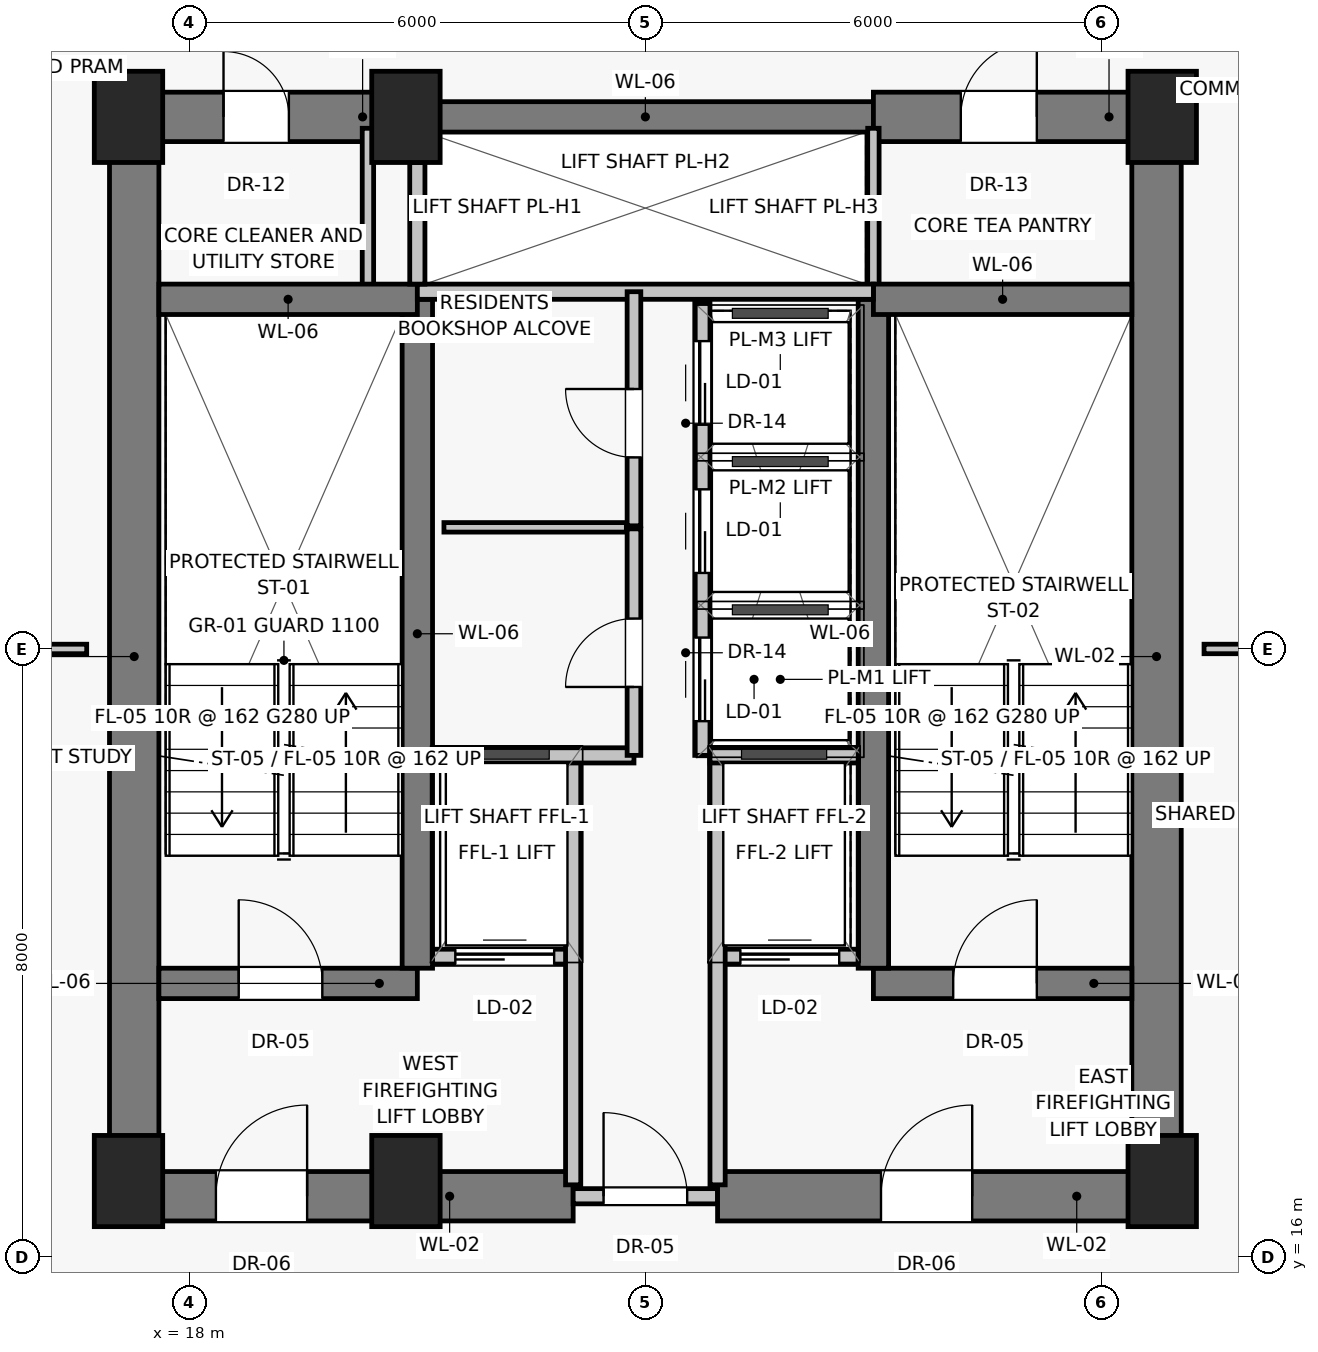
"""IFC4 building model, lengths in metres.
Left out: names, types, materials, properties, quantities, classifications, styles, units other than length and angle.
Written with IfcOpenShell. Run it as: python <this file> out.ifc"""

import sys

from ifc_helpers import new_model, si_unit, direction, frame, frame_2d, origin, origin_2d, place, context, subcontext, project, spatial, rectangle, extrude, source, transform, mapped, element, fill, save


model = new_model("IFC4")
c1 = context("Model", 3, precision=1e-05, world=origin(), true_north=direction((0.0, 1.0)))
c2 = subcontext(c1, "Body", "Model", "MODEL_VIEW")
j1 = project(units=[si_unit("LENGTHUNIT", "METRE"), si_unit("PLANEANGLEUNIT", "RADIAN")], contexts=[c1])
p1 = place(None, origin())
s1 = spatial("IfcSite", under=j1, at=p1, CompositionType="ELEMENT")
p2 = place(p1, origin())
s2 = spatial("IfcBuilding", under=s1, at=p2, CompositionType="ELEMENT")
p3 = place(p2, frame((0.0, 0.0, 116.5)))
s3 = spatial("IfcBuildingStorey", under=s2, at=p3, CompositionType="ELEMENT", Elevation=116.5)
for number, where, z_axis, x_axis in (
    (1, (17.2, 17.0, 0.0), (0.0, 0.0, 1.0), (1.0, 0.0, 0.0)),
    (2, (20.85, 17.0, 0.0), (0.0, 0.0, 1.0), (1.0, 0.0, 0.0)),
    (3, (30.8, 17.0, 0.0), (0.0, 0.0, 1.0), (1.0, 0.0, 0.0)),
    (4, (17.2, 31.0, 0.0), (0.0, 0.0, 1.0), (1.0, 0.0, 0.0)),
    (5, (20.85, 31.0, 0.0), (0.0, 0.0, 1.0), (1.0, 0.0, 0.0)),
    (6, (30.8, 31.0, 0.0), (0.0, 0.0, 1.0), (1.0, 0.0, 0.0)),
):
    element("IfcColumn", number, at=place(p3, frame(where, z_axis=z_axis, x_axis=x_axis)), inside=s3, PredefinedType="PILASTER", context=c2, shape_type="SweptSolid", body=[
        extrude(rectangle(XDim=0.9, YDim=1.2, at=origin_2d()), origin(), (0.0, 0.0, 1.0), 3.25),
    ])
for number, where, z_axis, x_axis in (
    (7, (17.275, 16.8, 0.0), (0.0, 0.0, 1.0), (0.0, 1.0, 0.0)),
    (8, (30.725, 16.8, 0.0), (0.0, 0.0, 1.0), (0.0, 1.0, 0.0)),
):
    element("IfcWall", number, at=place(p3, frame(where, z_axis=z_axis, x_axis=x_axis)), inside=s3, PredefinedType="SHEAR", context=c2, shape_type="SweptSolid", body=[
        extrude(rectangle(XDim=14.2, YDim=0.65, at=frame_2d((7.1, 0.0))), origin(), (0.0, 0.0, 1.0), 3.0),
    ])
p4 = place(p3, frame((17.2, 16.8, 0.0), z_axis=(0.0, 0.0, 1.0), x_axis=(1.0, 0.0, 0.0)))
e9 = element("IfcWall", 9, at=p4, inside=s3, PredefinedType="SHEAR", context=c2, shape_type="SweptSolid", body=[
    extrude(rectangle(XDim=5.85, YDim=0.65, at=frame_2d((2.925, 0.0))), origin(), (0.0, 0.0, 1.0), 3.0),
])
p5 = place(p4, frame((1.15, 0.0, 0.0)))
e10 = element("IfcOpeningElement", 10, at=p5, cuts=e9, PredefinedType="OPENING", context=c2, shape_type="SweptSolid", body=[
    extrude(rectangle(XDim=1.2, YDim=2.03, at=frame_2d((0.6, 1.015))), frame((0.0, 0.335, 0.0), z_axis=(0.0, -1.0, 0.0), x_axis=(1.0, 0.0, 0.0)), (0.0, 0.0, 1.0), 0.67),
])
p6 = place(p3, frame((23.05, 16.8, 0.0), z_axis=(0.0, 0.0, 1.0), x_axis=(1.0, 0.0, 0.0)))
e11 = element("IfcWall", 11, at=p6, inside=s3, PredefinedType="SOLIDWALL", context=c2, shape_type="SweptSolid", body=[
    extrude(rectangle(XDim=1.9, YDim=0.2, at=frame_2d((0.95, 0.0))), origin(), (0.0, 0.0, 1.0), 2.15),
])
p7 = place(p6, frame((0.4, 0.0, 0.0)))
e12 = element("IfcOpeningElement", 12, at=p7, cuts=e11, PredefinedType="OPENING", context=c2, shape_type="SweptSolid", body=[
    extrude(rectangle(XDim=1.1, YDim=2.03, at=frame_2d((0.55, 1.015))), frame((0.0, 0.11, 0.0), z_axis=(0.0, -1.0, 0.0), x_axis=(1.0, 0.0, 0.0)), (0.0, 0.0, 1.0), 0.22),
])
p8 = place(p3, frame((24.95, 16.8, 0.0), z_axis=(0.0, 0.0, 1.0), x_axis=(1.0, 0.0, 0.0)))
e13 = element("IfcWall", 13, at=p8, inside=s3, PredefinedType="SHEAR", context=c2, shape_type="SweptSolid", body=[
    extrude(rectangle(XDim=5.85, YDim=0.65, at=frame_2d((2.925, 0.0))), origin(), (0.0, 0.0, 1.0), 3.0),
])
p9 = place(p8, frame((2.15, 0.0, 0.0)))
e14 = element("IfcOpeningElement", 14, at=p9, cuts=e13, PredefinedType="OPENING", context=c2, shape_type="SweptSolid", body=[
    extrude(rectangle(XDim=1.2, YDim=2.03, at=frame_2d((0.6, 1.015))), frame((0.0, 0.335, 0.0), z_axis=(0.0, -1.0, 0.0), x_axis=(1.0, 0.0, 0.0)), (0.0, 0.0, 1.0), 0.67),
])
p10 = place(p3, frame((17.2, 31.0, 0.0), z_axis=(0.0, 0.0, 1.0), x_axis=(1.0, 0.0, 0.0)))
e15 = element("IfcWall", 15, at=p10, inside=s3, PredefinedType="SHEAR", context=c2, shape_type="SweptSolid", body=[
    extrude(rectangle(XDim=3.8, YDim=0.65, at=frame_2d((1.9, 0.0))), origin(), (0.0, 0.0, 1.0), 3.0),
])
p11 = place(p10, frame((1.25, 0.0, 0.0)))
e16 = element("IfcOpeningElement", 16, at=p11, cuts=e15, PredefinedType="OPENING", context=c2, shape_type="SweptSolid", body=[
    extrude(rectangle(XDim=0.86, YDim=2.01, at=frame_2d((0.43, 1.005))), frame((0.0, 0.335, 0.0), z_axis=(0.0, -1.0, 0.0), x_axis=(1.0, 0.0, 0.0)), (0.0, 0.0, 1.0), 0.67),
])
p12 = place(p3, frame((21.0, 31.0, 0.0), z_axis=(0.0, 0.0, 1.0), x_axis=(1.0, 0.0, 0.0)))
e17 = element("IfcWall", 17, at=p12, inside=s3, PredefinedType="SHEAR", context=c2, shape_type="SweptSolid", body=[
    extrude(rectangle(XDim=6.0, YDim=0.4, at=frame_2d((3.0, 0.0))), origin(), (0.0, 0.0, 1.0), 3.0),
])
p13 = place(p3, frame((27.0, 31.0, 0.0), z_axis=(0.0, 0.0, 1.0), x_axis=(1.0, 0.0, 0.0)))
e18 = element("IfcWall", 18, at=p13, inside=s3, PredefinedType="SHEAR", context=c2, shape_type="SweptSolid", body=[
    extrude(rectangle(XDim=3.8, YDim=0.65, at=frame_2d((1.9, 0.0))), origin(), (0.0, 0.0, 1.0), 3.0),
])
p14 = place(p13, frame((1.15, 0.0, 0.0)))
e19 = element("IfcOpeningElement", 19, at=p14, cuts=e18, PredefinedType="OPENING", context=c2, shape_type="SweptSolid", body=[
    extrude(rectangle(XDim=1.0, YDim=2.01, at=frame_2d((0.5, 1.005))), frame((0.0, 0.335, 0.0), z_axis=(0.0, -1.0, 0.0), x_axis=(1.0, 0.0, 0.0)), (0.0, 0.0, 1.0), 0.67),
])
for number, where, z_axis, x_axis in (
    (20, (20.35, 28.65, 0.0), (0.0, 0.0, 1.0), (0.0, 1.0, 0.0)),
    (21, (27.0, 28.65, 0.0), (0.0, 0.0, 1.0), (0.0, 1.0, 0.0)),
):
    element("IfcWall", number, at=place(p3, frame(where, z_axis=z_axis, x_axis=x_axis)), inside=s3, PredefinedType="PARTITIONING", context=c2, shape_type="SweptSolid", body=[
        extrude(rectangle(XDim=2.2, YDim=0.15, at=frame_2d((1.1, 0.0))), origin(), (0.0, 0.0, 1.0), 3.0),
    ])
p15 = place(p3, frame((17.6, 19.6, 0.0), z_axis=(0.0, 0.0, 1.0), x_axis=(1.0, 0.0, 0.0)))
e22 = element("IfcWall", 22, at=p15, inside=s3, PredefinedType="SHEAR", context=c2, shape_type="SweptSolid", body=[
    extrude(rectangle(XDim=3.4, YDim=0.4, at=frame_2d((1.7, 0.0))), origin(), (0.0, 0.0, 1.0), 3.0),
])
p16 = place(p15, frame((1.05, 0.0, 0.0)))
e23 = element("IfcOpeningElement", 23, at=p16, cuts=e22, PredefinedType="OPENING", context=c2, shape_type="SweptSolid", body=[
    extrude(rectangle(XDim=1.1, YDim=2.03, at=frame_2d((0.55, 1.015))), frame((0.0, 0.21, 0.0), z_axis=(0.0, -1.0, 0.0), x_axis=(1.0, 0.0, 0.0)), (0.0, 0.0, 1.0), 0.42),
])
p17 = place(p3, frame((21.2, 19.95, 0.0), z_axis=(0.0, 0.0, 1.0), x_axis=(1.0, 0.0, 0.0)))
e24 = element("IfcWall", 24, at=p17, inside=s3, PredefinedType="SOLIDWALL", context=c2, shape_type="SweptSolid", body=[
    extrude(rectangle(XDim=1.85, YDim=0.2, at=frame_2d((0.925, 0.0))), origin(), (0.0, 0.0, 1.0), 3.0),
])
p18 = place(p17, frame((0.3, 0.0, 0.0)))
e25 = element("IfcOpeningElement", 25, at=p18, cuts=e24, PredefinedType="OPENING", context=c2, shape_type="SweptSolid", body=[
    extrude(rectangle(XDim=1.3, YDim=2.25, at=frame_2d((0.65, 1.125))), frame((0.0, 0.11, 0.0), z_axis=(0.0, -1.0, 0.0), x_axis=(1.0, 0.0, 0.0)), (0.0, 0.0, 1.0), 0.22),
])
p19 = place(p3, frame((24.95, 19.95, 0.0), z_axis=(0.0, 0.0, 1.0), x_axis=(1.0, 0.0, 0.0)))
e26 = element("IfcWall", 26, at=p19, inside=s3, PredefinedType="SOLIDWALL", context=c2, shape_type="SweptSolid", body=[
    extrude(rectangle(XDim=1.85, YDim=0.2, at=frame_2d((0.925, 0.0))), origin(), (0.0, 0.0, 1.0), 3.0),
])
p20 = place(p19, frame((0.3, 0.0, 0.0)))
e27 = element("IfcOpeningElement", 27, at=p20, cuts=e26, PredefinedType="OPENING", context=c2, shape_type="SweptSolid", body=[
    extrude(rectangle(XDim=1.3, YDim=2.25, at=frame_2d((0.65, 1.125))), frame((0.0, 0.11, 0.0), z_axis=(0.0, -1.0, 0.0), x_axis=(1.0, 0.0, 0.0)), (0.0, 0.0, 1.0), 0.22),
])
p21 = place(p3, frame((27.0, 19.6, 0.0), z_axis=(0.0, 0.0, 1.0), x_axis=(1.0, 0.0, 0.0)))
e28 = element("IfcWall", 28, at=p21, inside=s3, PredefinedType="SHEAR", context=c2, shape_type="SweptSolid", body=[
    extrude(rectangle(XDim=3.4, YDim=0.4, at=frame_2d((1.7, 0.0))), origin(), (0.0, 0.0, 1.0), 3.0),
])
p22 = place(p21, frame((1.05, 0.0, 0.0)))
e29 = element("IfcOpeningElement", 29, at=p22, cuts=e28, PredefinedType="OPENING", context=c2, shape_type="SweptSolid", body=[
    extrude(rectangle(XDim=1.1, YDim=2.03, at=frame_2d((0.55, 1.015))), frame((0.0, 0.21, 0.0), z_axis=(0.0, -1.0, 0.0), x_axis=(1.0, 0.0, 0.0)), (0.0, 0.0, 1.0), 0.42),
])
for number, where, z_axis, x_axis in (
    (30, (21.0, 19.8, 0.0), (0.0, 0.0, 1.0), (0.0, 1.0, 0.0)),
    (31, (27.0, 19.8, 0.0), (0.0, 0.0, 1.0), (0.0, 1.0, 0.0)),
):
    element("IfcWall", number, at=place(p3, frame(where, z_axis=z_axis, x_axis=x_axis)), inside=s3, PredefinedType="SHEAR", context=c2, shape_type="SweptSolid", body=[
        extrude(rectangle(XDim=8.8, YDim=0.4, at=frame_2d((4.4, 0.0))), origin(), (0.0, 0.0, 1.0), 3.0),
    ])
for number, where, z_axis, x_axis in (
    (32, (17.6, 28.6, 0.0), (0.0, 0.0, 1.0), (1.0, 0.0, 0.0)),
    (33, (27.0, 28.6, 0.0), (0.0, 0.0, 1.0), (1.0, 0.0, 0.0)),
):
    element("IfcWall", number, at=place(p3, frame(where, z_axis=z_axis, x_axis=x_axis)), inside=s3, PredefinedType="SHEAR", context=c2, shape_type="SweptSolid", body=[
        extrude(rectangle(XDim=3.4, YDim=0.4, at=frame_2d((1.7, 0.0))), origin(), (0.0, 0.0, 1.0), 3.0),
    ])
for number, where, z_axis, x_axis in (
    (34, (23.05, 16.95, 0.0), (0.0, 0.0, 1.0), (0.0, 1.0, 0.0)),
    (35, (24.95, 16.95, 0.0), (0.0, 0.0, 1.0), (0.0, 1.0, 0.0)),
):
    element("IfcWall", number, at=place(p3, frame(where, z_axis=z_axis, x_axis=x_axis)), inside=s3, PredefinedType="SOLIDWALL", context=c2, shape_type="SweptSolid", body=[
        extrude(rectangle(XDim=5.6, YDim=0.2, at=frame_2d((2.8, 0.0))), origin(), (0.0, 0.0, 1.0), 3.0),
    ])
p23 = place(p3, frame((21.2, 22.6, 0.0), z_axis=(0.0, 0.0, 1.0), x_axis=(1.0, 0.0, 0.0)))
e36 = element("IfcWall", 36, at=p23, inside=s3, PredefinedType="SOLIDWALL", context=c2, shape_type="SweptSolid", body=[
    extrude(rectangle(XDim=2.65, YDim=0.2, at=frame_2d((1.325, 0.0))), origin(), (0.0, 0.0, 1.0), 3.0),
])
p24 = place(p3, frame((24.85, 22.6, 0.0), z_axis=(0.0, 0.0, 1.0), x_axis=(1.0, 0.0, 0.0)))
e37 = element("IfcWall", 37, at=p24, inside=s3, PredefinedType="SOLIDWALL", context=c2, shape_type="SweptSolid", body=[
    extrude(rectangle(XDim=1.95, YDim=0.2, at=frame_2d((0.975, 0.0))), origin(), (0.0, 0.0, 1.0), 3.0),
])
p25 = place(p3, frame((21.0, 28.7, 0.0), z_axis=(0.0, 0.0, 1.0), x_axis=(1.0, 0.0, 0.0)))
e38 = element("IfcWall", 38, at=p25, inside=s3, PredefinedType="SOLIDWALL", context=c2, shape_type="SweptSolid", body=[
    extrude(rectangle(XDim=6.0, YDim=0.2, at=frame_2d((3.0, 0.0))), origin(), (0.0, 0.0, 1.0), 3.0),
])
p26 = place(p3, frame((21.0, 28.8, 0.0), z_axis=(0.0, 0.0, 1.0), x_axis=(0.0, 1.0, 0.0)))
e39 = element("IfcWall", 39, at=p26, inside=s3, PredefinedType="SOLIDWALL", context=c2, shape_type="SweptSolid", body=[
    extrude(rectangle(XDim=1.6, YDim=0.2, at=frame_2d((0.8, 0.0))), origin(), (0.0, 0.0, 1.0), 3.0),
])
p27 = place(p3, frame((23.85, 22.6, 0.0), z_axis=(0.0, 0.0, 1.0), x_axis=(0.0, 1.0, 0.0)))
e40 = element("IfcWall", 40, at=p27, inside=s3, PredefinedType="PARTITIONING", context=c2, shape_type="SweptSolid", body=[
    extrude(rectangle(XDim=2.98, YDim=0.18, at=frame_2d((1.49, 0.0))), origin(), (0.0, 0.0, 1.0), 3.0),
])
p28 = place(p27, frame((0.9, 0.0, 0.0)))
e41 = element("IfcOpeningElement", 41, at=p28, cuts=e40, PredefinedType="OPENING", context=c2, shape_type="SweptSolid", body=[
    extrude(rectangle(XDim=0.9, YDim=2.01, at=frame_2d((0.45, 1.005))), frame((0.0, 0.1, 0.0), z_axis=(0.0, -1.0, 0.0), x_axis=(1.0, 0.0, 0.0)), (0.0, 0.0, 1.0), 0.2),
])
p29 = place(p3, frame((23.85, 25.62, 0.0), z_axis=(0.0, 0.0, 1.0), x_axis=(0.0, 1.0, 0.0)))
e42 = element("IfcWall", 42, at=p29, inside=s3, PredefinedType="PARTITIONING", context=c2, shape_type="SweptSolid", body=[
    extrude(rectangle(XDim=3.08, YDim=0.18, at=frame_2d((1.54, 0.0))), origin(), (0.0, 0.0, 1.0), 3.0),
])
p30 = place(p29, frame((0.9, 0.0, 0.0)))
e43 = element("IfcOpeningElement", 43, at=p30, cuts=e42, PredefinedType="OPENING", context=c2, shape_type="SweptSolid", body=[
    extrude(rectangle(XDim=0.9, YDim=2.01, at=frame_2d((0.45, 1.005))), frame((0.0, 0.1, 0.0), z_axis=(0.0, -1.0, 0.0), x_axis=(1.0, 0.0, 0.0)), (0.0, 0.0, 1.0), 0.2),
])
p31 = place(p3, frame((24.75, 22.6, 0.0), z_axis=(0.0, 0.0, 1.0), x_axis=(0.0, 1.0, 0.0)))
e44 = element("IfcWall", 44, at=p31, inside=s3, PredefinedType="SOLIDWALL", context=c2, shape_type="SweptSolid", body=[
    extrude(rectangle(XDim=5.95, YDim=0.2, at=frame_2d((2.975, 0.0))), origin(), (0.0, 0.0, 1.0), 3.0),
])
p32 = place(p31, frame((0.45, 0.0, 0.0)))
e45 = element("IfcOpeningElement", 45, at=p32, cuts=e44, PredefinedType="OPENING", context=c2, shape_type="SweptSolid", body=[
    extrude(rectangle(XDim=1.1, YDim=2.08, at=frame_2d((0.55, 1.04))), frame((0.0, 0.11, 0.0), z_axis=(0.0, -1.0, 0.0), x_axis=(1.0, 0.0, 0.0)), (0.0, 0.0, 1.0), 0.22),
])
p33 = place(p31, frame((2.4, 0.0, 0.0)))
e46 = element("IfcOpeningElement", 46, at=p33, cuts=e44, PredefinedType="OPENING", context=c2, shape_type="SweptSolid", body=[
    extrude(rectangle(XDim=1.1, YDim=2.08, at=frame_2d((0.55, 1.04))), frame((0.0, 0.11, 0.0), z_axis=(0.0, -1.0, 0.0), x_axis=(1.0, 0.0, 0.0)), (0.0, 0.0, 1.0), 0.22),
])
p34 = place(p31, frame((4.35, 0.0, 0.0)))
e47 = element("IfcOpeningElement", 47, at=p34, cuts=e44, PredefinedType="OPENING", context=c2, shape_type="SweptSolid", body=[
    extrude(rectangle(XDim=1.1, YDim=2.08, at=frame_2d((0.55, 1.04))), frame((0.0, 0.11, 0.0), z_axis=(0.0, -1.0, 0.0), x_axis=(1.0, 0.0, 0.0)), (0.0, 0.0, 1.0), 0.22),
])
p35 = place(p3, frame((21.35, 25.6, 0.0), z_axis=(0.0, 0.0, 1.0), x_axis=(1.0, 0.0, 0.0)))
e48 = element("IfcWall", 48, at=p35, inside=s3, PredefinedType="PARTITIONING", context=c2, shape_type="SweptSolid", body=[
    extrude(rectangle(XDim=2.4, YDim=0.125, at=frame_2d((1.2, 0.0))), origin(), (0.0, 0.0, 1.0), 3.0),
])
for number, where, z_axis, x_axis in (
    (49, (14.55, 24.0, 0.0), (0.0, 0.0, 1.0), (1.0, 0.0, 0.0)),
    (50, (31.35, 24.0, 0.0), (0.0, 0.0, 1.0), (1.0, 0.0, 0.0)),
):
    element("IfcWall", number, at=place(p3, frame(where, z_axis=z_axis, x_axis=x_axis)), inside=s3, PredefinedType="PARTITIONING", context=c2, shape_type="SweptSolid", body=[
        extrude(rectangle(XDim=2.1, YDim=0.125, at=frame_2d((1.05, 0.0))), origin(), (0.0, 0.0, 1.0), 3.0),
    ])
m1 = source(origin(), c2, "Body", "SweptSolid", [
    extrude(rectangle(XDim=1.2, YDim=2.03, at=frame_2d((0.6, 1.015))), frame((0.0, 0.025, 0.0), z_axis=(0.0, -1.0, 0.0), x_axis=(1.0, 0.0, 0.0)), (0.0, 0.0, 1.0), 0.05),
])
p36 = place(p5, origin())
e51 = element("IfcDoor", 51, at=p36, inside=s3, OperationType="SINGLE_SWING_RIGHT", PredefinedType="DOOR", context=c2, shape_type="MappedRepresentation", body=[
    mapped(m1, transform((0.0, 0.0, 0.0), scale=1.0)),
])
fill(e10, e51)
m2 = source(origin(), c2, "Body", "SweptSolid", [
    extrude(rectangle(XDim=1.1, YDim=2.03, at=frame_2d((0.55, 1.015))), frame((0.0, 0.025, 0.0), z_axis=(0.0, -1.0, 0.0), x_axis=(1.0, 0.0, 0.0)), (0.0, 0.0, 1.0), 0.05),
])
p37 = place(p7, origin())
e52 = element("IfcDoor", 52, at=p37, inside=s3, OperationType="SINGLE_SWING_LEFT", PredefinedType="DOOR", context=c2, shape_type="MappedRepresentation", body=[
    mapped(m2, transform((0.0, 0.0, 0.0), scale=1.0)),
])
fill(e12, e52)
p38 = place(p9, origin())
e53 = element("IfcDoor", 53, at=p38, inside=s3, OperationType="SINGLE_SWING_RIGHT", PredefinedType="DOOR", context=c2, shape_type="MappedRepresentation", body=[
    mapped(m1, transform((0.0, 0.0, 0.0), scale=1.0)),
])
fill(e14, e53)
m3 = source(origin(), c2, "Body", "SweptSolid", [
    extrude(rectangle(XDim=0.86, YDim=2.01, at=frame_2d((0.43, 1.005))), frame((0.0, 0.025, 0.0), z_axis=(0.0, -1.0, 0.0), x_axis=(1.0, 0.0, 0.0)), (0.0, 0.0, 1.0), 0.05),
])
p39 = place(p11, origin())
e54 = element("IfcDoor", 54, at=p39, inside=s3, OperationType="SINGLE_SWING_LEFT", PredefinedType="DOOR", context=c2, shape_type="MappedRepresentation", body=[
    mapped(m3, transform((0.0, 0.0, 0.0), scale=1.0)),
])
fill(e16, e54)
m4 = source(origin(), c2, "Body", "SweptSolid", [
    extrude(rectangle(XDim=1.0, YDim=2.01, at=frame_2d((0.5, 1.005))), frame((0.0, 0.025, 0.0), z_axis=(0.0, -1.0, 0.0), x_axis=(1.0, 0.0, 0.0)), (0.0, 0.0, 1.0), 0.05),
])
p40 = place(p14, origin())
e55 = element("IfcDoor", 55, at=p40, inside=s3, OperationType="SINGLE_SWING_RIGHT", PredefinedType="DOOR", context=c2, shape_type="MappedRepresentation", body=[
    mapped(m4, transform((0.0, 0.0, 0.0), scale=1.0)),
])
fill(e19, e55)
p41 = place(p16, origin())
e56 = element("IfcDoor", 56, at=p41, inside=s3, OperationType="SINGLE_SWING_LEFT", PredefinedType="DOOR", context=c2, shape_type="MappedRepresentation", body=[
    mapped(m2, transform((0.0, 0.0, 0.0), scale=1.0)),
])
fill(e23, e56)
m5 = source(origin(), c2, "Body", "SweptSolid", [
    extrude(rectangle(XDim=1.3, YDim=2.25, at=frame_2d((0.65, 1.125))), frame((0.0, 0.025, 0.0), z_axis=(0.0, -1.0, 0.0), x_axis=(1.0, 0.0, 0.0)), (0.0, 0.0, 1.0), 0.05),
])
p42 = place(p18, origin())
e57 = element("IfcDoor", 57, at=p42, inside=s3, OperationType="SLIDING_TO_LEFT", PredefinedType="DOOR", context=c2, shape_type="MappedRepresentation", body=[
    mapped(m5, transform((0.0, 0.0, 0.0), scale=1.0)),
])
fill(e25, e57)
p43 = place(p20, origin())
e58 = element("IfcDoor", 58, at=p43, inside=s3, OperationType="SLIDING_TO_LEFT", PredefinedType="DOOR", context=c2, shape_type="MappedRepresentation", body=[
    mapped(m5, transform((0.0, 0.0, 0.0), scale=1.0)),
])
fill(e27, e58)
p44 = place(p22, origin())
e59 = element("IfcDoor", 59, at=p44, inside=s3, OperationType="SINGLE_SWING_RIGHT", PredefinedType="DOOR", context=c2, shape_type="MappedRepresentation", body=[
    mapped(m2, transform((0.0, 0.0, 0.0), scale=1.0)),
])
fill(e29, e59)
m6 = source(origin(), c2, "Body", "SweptSolid", [
    extrude(rectangle(XDim=0.9, YDim=2.01, at=frame_2d((0.45, 1.005))), frame((0.0, 0.025, 0.0), z_axis=(0.0, -1.0, 0.0), x_axis=(1.0, 0.0, 0.0)), (0.0, 0.0, 1.0), 0.05),
])
p45 = place(p28, origin())
e60 = element("IfcDoor", 60, at=p45, inside=s3, OperationType="SINGLE_SWING_LEFT", PredefinedType="DOOR", context=c2, shape_type="MappedRepresentation", body=[
    mapped(m6, transform((0.0, 0.0, 0.0), scale=1.0)),
])
fill(e41, e60)
p46 = place(p30, origin())
e61 = element("IfcDoor", 61, at=p46, inside=s3, OperationType="SINGLE_SWING_RIGHT", PredefinedType="DOOR", context=c2, shape_type="MappedRepresentation", body=[
    mapped(m6, transform((0.0, 0.0, 0.0), scale=1.0)),
])
fill(e43, e61)
m7 = source(origin(), c2, "Body", "SweptSolid", [
    extrude(rectangle(XDim=1.1, YDim=2.08, at=frame_2d((0.55, 1.04))), frame((0.0, 0.025, 0.0), z_axis=(0.0, -1.0, 0.0), x_axis=(1.0, 0.0, 0.0)), (0.0, 0.0, 1.0), 0.05),
])
p47 = place(p32, origin())
e62 = element("IfcDoor", 62, at=p47, inside=s3, OperationType="SLIDING_TO_LEFT", PredefinedType="DOOR", context=c2, shape_type="MappedRepresentation", body=[
    mapped(m7, transform((0.0, 0.0, 0.0), scale=1.0)),
])
fill(e45, e62)
p48 = place(p33, origin())
e63 = element("IfcDoor", 63, at=p48, inside=s3, OperationType="SLIDING_TO_LEFT", PredefinedType="DOOR", context=c2, shape_type="MappedRepresentation", body=[
    mapped(m7, transform((0.0, 0.0, 0.0), scale=1.0)),
])
fill(e46, e63)
p49 = place(p34, origin())
e64 = element("IfcDoor", 64, at=p49, inside=s3, OperationType="SLIDING_TO_LEFT", PredefinedType="DOOR", context=c2, shape_type="MappedRepresentation", body=[
    mapped(m7, transform((0.0, 0.0, 0.0), scale=1.0)),
])
fill(e47, e64)
save(model, sys.argv[1])
